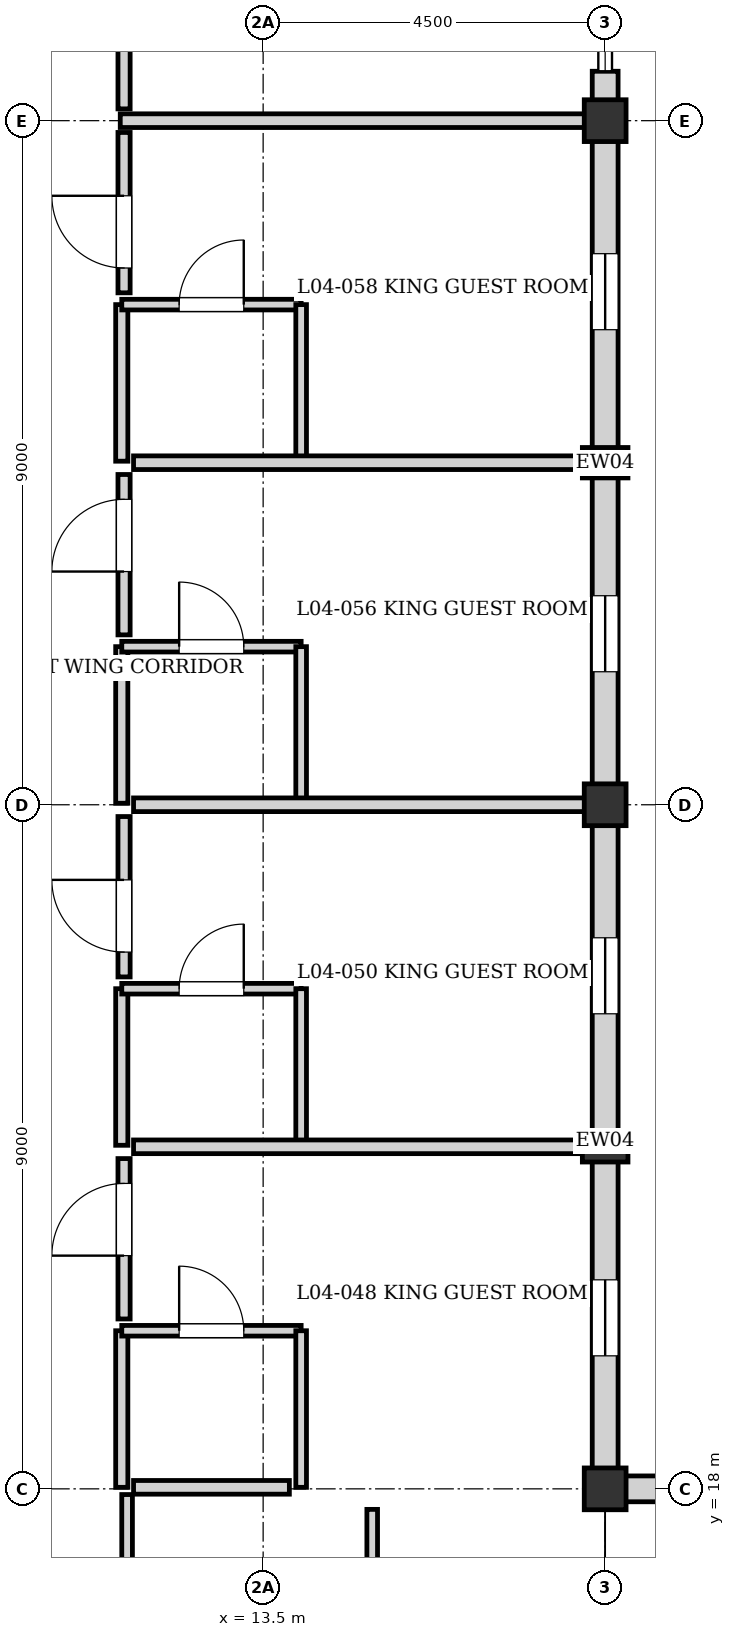
"""IFC4 building model, lengths in metres.
Left out: names, types, materials, properties, quantities, classifications, styles, units other than length and angle.
Written with IfcOpenShell. Run it as: python <this file> out.ifc"""

import sys

from ifc_helpers import new_model, si_unit, direction, frame, frame_2d, origin, origin_2d, place, context, subcontext, project, spatial, rectangle, extrude, element, fill, save


model = new_model("IFC4")
c1 = context("Model", 3, precision=1e-05, world=origin(), true_north=direction((0.0, 1.0)))
c2 = subcontext(c1, "Body", "Model", "MODEL_VIEW")
j1 = project(units=[si_unit("LENGTHUNIT", "METRE"), si_unit("PLANEANGLEUNIT", "RADIAN")], contexts=[c1])
p1 = place(None, origin())
s1 = spatial("IfcSite", under=j1, at=p1, CompositionType="ELEMENT")
p2 = place(p1, origin())
s2 = spatial("IfcBuilding", under=s1, at=p2, CompositionType="ELEMENT")
p3 = place(p2, frame((0.0, 0.0, 14.56)))
s3 = spatial("IfcBuildingStorey", under=s2, at=p3, CompositionType="ELEMENT", Elevation=14.56)
for number, where, z_axis, x_axis in (
    (1, (18.0, 18.0, 0.0), (0.0, 0.0, 1.0), (1.0, 0.0, 0.0)),
    (2, (18.0, 27.0, 0.0), (0.0, 0.0, 1.0), (1.0, 0.0, 0.0)),
    (3, (18.0, 36.0, 0.0), (0.0, 0.0, 1.0), (1.0, 0.0, 0.0)),
):
    element("IfcColumn", number, at=place(p3, frame(where, z_axis=z_axis, x_axis=x_axis)), inside=s3, PredefinedType="COLUMN", context=c2, shape_type="SweptSolid", body=[
        extrude(rectangle(XDim=0.55, YDim=0.55, at=origin_2d()), origin(), (0.0, 0.0, 1.0), 3.04),
    ])
for number, where, z_axis, x_axis in (
    (4, (18.0, 22.5, 0.0), (0.0, 0.0, 1.0), (0.0, 1.0, 0.0)),
    (5, (18.0, 31.5, 0.0), (0.0, 0.0, 1.0), (0.0, 1.0, 0.0)),
):
    element("IfcColumn", number, at=place(p3, frame(where, z_axis=z_axis, x_axis=x_axis)), inside=s3, PredefinedType="PILASTER", context=c2, shape_type="SweptSolid", body=[
        extrude(rectangle(XDim=0.4, YDim=0.6, at=origin_2d()), origin(), (0.0, 0.0, 1.0), 3.04),
    ])
p4 = place(p3, frame((18.0, 36.65, 0.0), z_axis=(0.0, 0.0, 1.0), x_axis=(0.0, -1.0, 0.0)))
e6 = element("IfcWall", 6, at=p4, inside=s3, PredefinedType="SOLIDWALL", context=c2, shape_type="SweptSolid", body=[
    extrude(rectangle(XDim=0.65, YDim=0.34, at=frame_2d((0.325, 0.0))), origin(), (0.0, 0.0, 1.0), 2.38),
])
p5 = place(p3, frame((18.0, 36.0, 0.0), z_axis=(0.0, 0.0, 1.0), x_axis=(0.0, -1.0, 0.0)))
e7 = element("IfcWall", 7, at=p5, inside=s3, PredefinedType="SOLIDWALL", context=c2, shape_type="SweptSolid", body=[
    extrude(rectangle(XDim=9.0, YDim=0.34, at=frame_2d((4.5, 0.0))), origin(), (0.0, 0.0, 1.0), 2.42),
])
p6 = place(p5, frame((1.75, 0.0, 0.35)))
e8 = element("IfcOpeningElement", 8, at=p6, cuts=e7, PredefinedType="OPENING", context=c2, shape_type="SweptSolid", body=[
    extrude(rectangle(XDim=1.0, YDim=1.6, at=frame_2d((0.5, 0.8))), frame((0.0, 0.18, 0.0), z_axis=(0.0, -1.0, 0.0), x_axis=(1.0, 0.0, 0.0)), (0.0, 0.0, 1.0), 0.36),
])
p7 = place(p5, frame((6.25, 0.0, 0.35)))
e9 = element("IfcOpeningElement", 9, at=p7, cuts=e7, PredefinedType="OPENING", context=c2, shape_type="SweptSolid", body=[
    extrude(rectangle(XDim=1.0, YDim=1.6, at=frame_2d((0.5, 0.8))), frame((0.0, 0.18, 0.0), z_axis=(0.0, -1.0, 0.0), x_axis=(1.0, 0.0, 0.0)), (0.0, 0.0, 1.0), 0.36),
])
p8 = place(p3, frame((18.0, 27.0, 0.0), z_axis=(0.0, 0.0, 1.0), x_axis=(0.0, -1.0, 0.0)))
e10 = element("IfcWall", 10, at=p8, inside=s3, PredefinedType="SOLIDWALL", context=c2, shape_type="SweptSolid", body=[
    extrude(rectangle(XDim=8.845, YDim=0.34, at=frame_2d((4.422, 0.0))), origin(), (0.0, 0.0, 1.0), 2.48),
])
p9 = place(p8, frame((1.75, 0.0, 0.35)))
e11 = element("IfcOpeningElement", 11, at=p9, cuts=e10, PredefinedType="OPENING", context=c2, shape_type="SweptSolid", body=[
    extrude(rectangle(XDim=1.0, YDim=1.6, at=frame_2d((0.5, 0.8))), frame((0.0, 0.18, 0.0), z_axis=(0.0, -1.0, 0.0), x_axis=(1.0, 0.0, 0.0)), (0.0, 0.0, 1.0), 0.36),
])
p10 = place(p8, frame((6.25, 0.0, 0.35)))
e12 = element("IfcOpeningElement", 12, at=p10, cuts=e10, PredefinedType="OPENING", context=c2, shape_type="SweptSolid", body=[
    extrude(rectangle(XDim=1.0, YDim=1.6, at=frame_2d((0.5, 0.8))), frame((0.0, 0.18, 0.0), z_axis=(0.0, -1.0, 0.0), x_axis=(1.0, 0.0, 0.0)), (0.0, 0.0, 1.0), 0.36),
])
p11 = place(p3, frame((18.0, 18.0, 0.0), z_axis=(0.0, 0.0, 1.0), x_axis=(1.0, 0.0, 0.0)))
e13 = element("IfcWall", 13, at=p11, inside=s3, PredefinedType="SOLIDWALL", context=c2, shape_type="SweptSolid", body=[
    extrude(rectangle(XDim=9.0, YDim=0.34, at=frame_2d((4.5, 0.0))), origin(), (0.0, 0.0, 1.0), 2.55),
])
p12 = place(p11, frame((1.75, 0.0, 0.35)))
e14 = element("IfcOpeningElement", 14, at=p12, cuts=e13, PredefinedType="OPENING", context=c2, shape_type="SweptSolid", body=[
    extrude(rectangle(XDim=1.0, YDim=1.6, at=frame_2d((0.5, 0.8))), frame((0.0, 0.18, 0.0), z_axis=(0.0, -1.0, 0.0), x_axis=(1.0, 0.0, 0.0)), (0.0, 0.0, 1.0), 0.36),
])
p13 = place(p11, frame((6.25, 0.0, 0.35)))
e15 = element("IfcOpeningElement", 15, at=p13, cuts=e13, PredefinedType="OPENING", context=c2, shape_type="SweptSolid", body=[
    extrude(rectangle(XDim=1.0, YDim=1.6, at=frame_2d((0.5, 0.8))), frame((0.0, 0.18, 0.0), z_axis=(0.0, -1.0, 0.0), x_axis=(1.0, 0.0, 0.0)), (0.0, 0.0, 1.0), 0.36),
])
p14 = place(p3, frame((11.64, 18.02, 0.0), z_axis=(0.0, 0.0, 1.0), x_axis=(0.0, 1.0, 0.0)))
e16 = element("IfcWall", 16, at=p14, inside=s3, PredefinedType="PARTITIONING", context=c2, shape_type="SweptSolid", body=[
    extrude(rectangle(XDim=2.06, YDim=0.16, at=frame_2d((1.03, 0.0))), origin(), (0.0, 0.0, 1.0), 2.82),
])
p15 = place(p3, frame((11.64, 20.08, 0.0), z_axis=(0.0, 0.0, 1.0), x_axis=(1.0, 0.0, 0.0)))
e17 = element("IfcWall", 17, at=p15, inside=s3, PredefinedType="PLUMBINGWALL", context=c2, shape_type="SweptSolid", body=[
    extrude(rectangle(XDim=2.36, YDim=0.14, at=frame_2d((1.18, 0.0))), origin(), (0.0, 0.0, 1.0), 2.82),
])
p16 = place(p15, frame((0.755, 0.0, 0.0)))
e18 = element("IfcOpeningElement", 18, at=p16, cuts=e17, PredefinedType="OPENING", context=c2, shape_type="SweptSolid", body=[
    extrude(rectangle(XDim=0.85, YDim=2.04, at=frame_2d((0.425, 1.02))), frame((0.0, 0.08, 0.0), z_axis=(0.0, -1.0, 0.0), x_axis=(1.0, 0.0, 0.0)), (0.0, 0.0, 1.0), 0.16),
])
p17 = place(p3, frame((14.0, 18.02, 0.0), z_axis=(0.0, 0.0, 1.0), x_axis=(0.0, 1.0, 0.0)))
e19 = element("IfcWall", 19, at=p17, inside=s3, PredefinedType="PLUMBINGWALL", context=c2, shape_type="SweptSolid", body=[
    extrude(rectangle(XDim=2.06, YDim=0.14, at=frame_2d((1.03, 0.0))), origin(), (0.0, 0.0, 1.0), 2.82),
])
p18 = place(p3, frame((11.64, 22.52, 0.0), z_axis=(0.0, 0.0, 1.0), x_axis=(0.0, 1.0, 0.0)))
e20 = element("IfcWall", 20, at=p18, inside=s3, PredefinedType="PARTITIONING", context=c2, shape_type="SweptSolid", body=[
    extrude(rectangle(XDim=2.06, YDim=0.16, at=frame_2d((1.03, 0.0))), origin(), (0.0, 0.0, 1.0), 2.82),
])
p19 = place(p3, frame((11.64, 24.58, 0.0), z_axis=(0.0, 0.0, 1.0), x_axis=(1.0, 0.0, 0.0)))
e21 = element("IfcWall", 21, at=p19, inside=s3, PredefinedType="PLUMBINGWALL", context=c2, shape_type="SweptSolid", body=[
    extrude(rectangle(XDim=2.36, YDim=0.14, at=frame_2d((1.18, 0.0))), origin(), (0.0, 0.0, 1.0), 2.82),
])
p20 = place(p19, frame((0.755, 0.0, 0.0)))
e22 = element("IfcOpeningElement", 22, at=p20, cuts=e21, PredefinedType="OPENING", context=c2, shape_type="SweptSolid", body=[
    extrude(rectangle(XDim=0.85, YDim=2.04, at=frame_2d((0.425, 1.02))), frame((0.0, 0.08, 0.0), z_axis=(0.0, -1.0, 0.0), x_axis=(1.0, 0.0, 0.0)), (0.0, 0.0, 1.0), 0.16),
])
p21 = place(p3, frame((14.0, 22.52, 0.0), z_axis=(0.0, 0.0, 1.0), x_axis=(0.0, 1.0, 0.0)))
e23 = element("IfcWall", 23, at=p21, inside=s3, PredefinedType="PLUMBINGWALL", context=c2, shape_type="SweptSolid", body=[
    extrude(rectangle(XDim=2.06, YDim=0.14, at=frame_2d((1.03, 0.0))), origin(), (0.0, 0.0, 1.0), 2.82),
])
p22 = place(p3, frame((11.64, 27.02, 0.0), z_axis=(0.0, 0.0, 1.0), x_axis=(0.0, 1.0, 0.0)))
e24 = element("IfcWall", 24, at=p22, inside=s3, PredefinedType="PARTITIONING", context=c2, shape_type="SweptSolid", body=[
    extrude(rectangle(XDim=2.06, YDim=0.16, at=frame_2d((1.03, 0.0))), origin(), (0.0, 0.0, 1.0), 2.82),
])
p23 = place(p3, frame((11.64, 29.08, 0.0), z_axis=(0.0, 0.0, 1.0), x_axis=(1.0, 0.0, 0.0)))
e25 = element("IfcWall", 25, at=p23, inside=s3, PredefinedType="PLUMBINGWALL", context=c2, shape_type="SweptSolid", body=[
    extrude(rectangle(XDim=2.36, YDim=0.14, at=frame_2d((1.18, 0.0))), origin(), (0.0, 0.0, 1.0), 2.82),
])
p24 = place(p23, frame((0.755, 0.0, 0.0)))
e26 = element("IfcOpeningElement", 26, at=p24, cuts=e25, PredefinedType="OPENING", context=c2, shape_type="SweptSolid", body=[
    extrude(rectangle(XDim=0.85, YDim=2.04, at=frame_2d((0.425, 1.02))), frame((0.0, 0.08, 0.0), z_axis=(0.0, -1.0, 0.0), x_axis=(1.0, 0.0, 0.0)), (0.0, 0.0, 1.0), 0.16),
])
p25 = place(p3, frame((14.0, 27.02, 0.0), z_axis=(0.0, 0.0, 1.0), x_axis=(0.0, 1.0, 0.0)))
e27 = element("IfcWall", 27, at=p25, inside=s3, PredefinedType="PLUMBINGWALL", context=c2, shape_type="SweptSolid", body=[
    extrude(rectangle(XDim=2.06, YDim=0.14, at=frame_2d((1.03, 0.0))), origin(), (0.0, 0.0, 1.0), 2.82),
])
p26 = place(p3, frame((11.64, 31.52, 0.0), z_axis=(0.0, 0.0, 1.0), x_axis=(0.0, 1.0, 0.0)))
e28 = element("IfcWall", 28, at=p26, inside=s3, PredefinedType="PARTITIONING", context=c2, shape_type="SweptSolid", body=[
    extrude(rectangle(XDim=2.06, YDim=0.16, at=frame_2d((1.03, 0.0))), origin(), (0.0, 0.0, 1.0), 2.82),
])
p27 = place(p3, frame((11.64, 33.58, 0.0), z_axis=(0.0, 0.0, 1.0), x_axis=(1.0, 0.0, 0.0)))
e29 = element("IfcWall", 29, at=p27, inside=s3, PredefinedType="PLUMBINGWALL", context=c2, shape_type="SweptSolid", body=[
    extrude(rectangle(XDim=2.36, YDim=0.14, at=frame_2d((1.18, 0.0))), origin(), (0.0, 0.0, 1.0), 2.82),
])
p28 = place(p27, frame((0.755, 0.0, 0.0)))
e30 = element("IfcOpeningElement", 30, at=p28, cuts=e29, PredefinedType="OPENING", context=c2, shape_type="SweptSolid", body=[
    extrude(rectangle(XDim=0.85, YDim=2.04, at=frame_2d((0.425, 1.02))), frame((0.0, 0.08, 0.0), z_axis=(0.0, -1.0, 0.0), x_axis=(1.0, 0.0, 0.0)), (0.0, 0.0, 1.0), 0.16),
])
p29 = place(p3, frame((14.0, 31.52, 0.0), z_axis=(0.0, 0.0, 1.0), x_axis=(0.0, 1.0, 0.0)))
e31 = element("IfcWall", 31, at=p29, inside=s3, PredefinedType="PLUMBINGWALL", context=c2, shape_type="SweptSolid", body=[
    extrude(rectangle(XDim=2.06, YDim=0.14, at=frame_2d((1.03, 0.0))), origin(), (0.0, 0.0, 1.0), 2.82),
])
p30 = place(p3, frame((11.795, 22.5, 0.0), z_axis=(0.0, 0.0, 1.0), x_axis=(1.0, 0.0, 0.0)))
e32 = element("IfcWall", 32, at=p30, inside=s3, PredefinedType="PARTITIONING", context=c2, shape_type="SweptSolid", body=[
    extrude(rectangle(XDim=6.03, YDim=0.18, at=frame_2d((3.015, 0.0))), origin(), (0.0, 0.0, 1.0), 2.82),
])
p31 = place(p3, frame((11.795, 27.0, 0.0), z_axis=(0.0, 0.0, 1.0), x_axis=(1.0, 0.0, 0.0)))
e33 = element("IfcWall", 33, at=p31, inside=s3, PredefinedType="PARTITIONING", context=c2, shape_type="SweptSolid", body=[
    extrude(rectangle(XDim=6.03, YDim=0.18, at=frame_2d((3.015, 0.0))), origin(), (0.0, 0.0, 1.0), 2.34),
])
p32 = place(p3, frame((11.795, 31.5, 0.0), z_axis=(0.0, 0.0, 1.0), x_axis=(1.0, 0.0, 0.0)))
e34 = element("IfcWall", 34, at=p32, inside=s3, PredefinedType="PARTITIONING", context=c2, shape_type="SweptSolid", body=[
    extrude(rectangle(XDim=6.03, YDim=0.18, at=frame_2d((3.015, 0.0))), origin(), (0.0, 0.0, 1.0), 2.82),
])
p33 = place(p3, frame((11.62, 36.0, 0.0), z_axis=(0.0, 0.0, 1.0), x_axis=(1.0, 0.0, 0.0)))
e35 = element("IfcWall", 35, at=p33, inside=s3, PredefinedType="PARTITIONING", context=c2, shape_type="SweptSolid", body=[
    extrude(rectangle(XDim=6.205, YDim=0.18, at=frame_2d((3.103, 0.0))), origin(), (0.0, 0.0, 1.0), 2.29),
])
p34 = place(p3, frame((11.795, 18.02, 0.0), z_axis=(0.0, 0.0, 1.0), x_axis=(1.0, 0.0, 0.0)))
e36 = element("IfcWall", 36, at=p34, inside=s3, PredefinedType="PARTITIONING", context=c2, shape_type="SweptSolid", body=[
    extrude(rectangle(XDim=2.05, YDim=0.18, at=frame_2d((1.025, 0.0))), origin(), (0.0, 0.0, 1.0), 2.38),
])
p35 = place(p3, frame((11.71, 11.705, 0.0), z_axis=(0.0, 0.0, 1.0), x_axis=(0.0, 1.0, 0.0)))
e37 = element("IfcWall", 37, at=p35, inside=s3, PredefinedType="PLUMBINGWALL", context=c2, shape_type="SweptSolid", body=[
    extrude(rectangle(XDim=6.22, YDim=0.14, at=frame_2d((3.11, 0.0))), origin(), (0.0, 0.0, 1.0), 2.82),
])
p36 = place(p35, frame((1.914, 0.0, 0.0)))
e38 = element("IfcOpeningElement", 38, at=p36, cuts=e37, PredefinedType="OPENING", context=c2, shape_type="SweptSolid", body=[
    extrude(rectangle(XDim=0.9, YDim=2.1, at=frame_2d((0.45, 1.05))), frame((0.0, 0.08, 0.0), z_axis=(0.0, -1.0, 0.0), x_axis=(1.0, 0.0, 0.0)), (0.0, 0.0, 1.0), 0.16),
])
p37 = place(p3, frame((11.67, 20.235, 0.0), z_axis=(0.0, 0.0, 1.0), x_axis=(0.0, 1.0, 0.0)))
e39 = element("IfcWall", 39, at=p37, inside=s3, PredefinedType="PARTITIONING", context=c2, shape_type="SweptSolid", body=[
    extrude(rectangle(XDim=2.11, YDim=0.16, at=frame_2d((1.055, 0.0))), origin(), (0.0, 0.0, 1.0), 2.82),
])
p38 = place(p37, frame((0.833, 0.0, 0.0)))
e40 = element("IfcOpeningElement", 40, at=p38, cuts=e39, PredefinedType="OPENING", context=c2, shape_type="SweptSolid", body=[
    extrude(rectangle(XDim=0.95, YDim=2.15, at=frame_2d((0.475, 1.075))), frame((0.0, 0.09, 0.0), z_axis=(0.0, -1.0, 0.0), x_axis=(1.0, 0.0, 0.0)), (0.0, 0.0, 1.0), 0.18),
])
p39 = place(p3, frame((11.67, 24.735, 0.0), z_axis=(0.0, 0.0, 1.0), x_axis=(0.0, 1.0, 0.0)))
e41 = element("IfcWall", 41, at=p39, inside=s3, PredefinedType="PARTITIONING", context=c2, shape_type="SweptSolid", body=[
    extrude(rectangle(XDim=2.11, YDim=0.16, at=frame_2d((1.055, 0.0))), origin(), (0.0, 0.0, 1.0), 2.82),
])
p40 = place(p39, frame((0.327, 0.0, 0.0)))
e42 = element("IfcOpeningElement", 42, at=p40, cuts=e41, PredefinedType="OPENING", context=c2, shape_type="SweptSolid", body=[
    extrude(rectangle(XDim=0.95, YDim=2.15, at=frame_2d((0.475, 1.075))), frame((0.0, 0.09, 0.0), z_axis=(0.0, -1.0, 0.0), x_axis=(1.0, 0.0, 0.0)), (0.0, 0.0, 1.0), 0.18),
])
p41 = place(p3, frame((11.67, 29.235, 0.0), z_axis=(0.0, 0.0, 1.0), x_axis=(0.0, 1.0, 0.0)))
e43 = element("IfcWall", 43, at=p41, inside=s3, PredefinedType="PARTITIONING", context=c2, shape_type="SweptSolid", body=[
    extrude(rectangle(XDim=2.11, YDim=0.16, at=frame_2d((1.055, 0.0))), origin(), (0.0, 0.0, 1.0), 2.82),
])
p42 = place(p41, frame((0.833, 0.0, 0.0)))
e44 = element("IfcOpeningElement", 44, at=p42, cuts=e43, PredefinedType="OPENING", context=c2, shape_type="SweptSolid", body=[
    extrude(rectangle(XDim=0.95, YDim=2.15, at=frame_2d((0.475, 1.075))), frame((0.0, 0.09, 0.0), z_axis=(0.0, -1.0, 0.0), x_axis=(1.0, 0.0, 0.0)), (0.0, 0.0, 1.0), 0.18),
])
p43 = place(p3, frame((11.67, 33.735, 0.0), z_axis=(0.0, 0.0, 1.0), x_axis=(0.0, 1.0, 0.0)))
e45 = element("IfcWall", 45, at=p43, inside=s3, PredefinedType="PARTITIONING", context=c2, shape_type="SweptSolid", body=[
    extrude(rectangle(XDim=2.11, YDim=0.16, at=frame_2d((1.055, 0.0))), origin(), (0.0, 0.0, 1.0), 2.82),
])
p44 = place(p43, frame((0.327, 0.0, 0.0)))
e46 = element("IfcOpeningElement", 46, at=p44, cuts=e45, PredefinedType="OPENING", context=c2, shape_type="SweptSolid", body=[
    extrude(rectangle(XDim=0.95, YDim=2.15, at=frame_2d((0.475, 1.075))), frame((0.0, 0.09, 0.0), z_axis=(0.0, -1.0, 0.0), x_axis=(1.0, 0.0, 0.0)), (0.0, 0.0, 1.0), 0.18),
])
p45 = place(p3, frame((11.67, 36.155, 0.0), z_axis=(0.0, 0.0, 1.0), x_axis=(0.0, 1.0, 0.0)))
e47 = element("IfcWall", 47, at=p45, inside=s3, PredefinedType="PARTITIONING", context=c2, shape_type="SweptSolid", body=[
    extrude(rectangle(XDim=4.125, YDim=0.16, at=frame_2d((2.062, 0.0))), origin(), (0.0, 0.0, 1.0), 2.82),
])
p46 = place(p45, frame((2.058, 0.0, 0.0)))
e48 = element("IfcOpeningElement", 48, at=p46, cuts=e47, PredefinedType="OPENING", context=c2, shape_type="SweptSolid", body=[
    extrude(rectangle(XDim=1.0, YDim=2.1, at=frame_2d((0.5, 1.05))), frame((0.0, 0.09, 0.0), z_axis=(0.0, -1.0, 0.0), x_axis=(1.0, 0.0, 0.0)), (0.0, 0.0, 1.0), 0.18),
])
p47 = place(p3, frame((14.935, 14.845, 0.0), z_axis=(0.0, 0.0, 1.0), x_axis=(0.0, 1.0, 0.0)))
e49 = element("IfcWall", 49, at=p47, inside=s3, PredefinedType="PLUMBINGWALL", context=c2, shape_type="SweptSolid", body=[
    extrude(rectangle(XDim=2.885, YDim=0.14, at=frame_2d((1.442, 0.0))), origin(), (0.0, 0.0, 1.0), 2.82),
])
p48 = place(p47, frame((0.646, 0.0, 0.0)))
e50 = element("IfcOpeningElement", 50, at=p48, cuts=e49, PredefinedType="OPENING", context=c2, shape_type="SweptSolid", body=[
    extrude(rectangle(XDim=0.9, YDim=2.1, at=frame_2d((0.45, 1.05))), frame((0.0, 0.08, 0.0), z_axis=(0.0, -1.0, 0.0), x_axis=(1.0, 0.0, 0.0)), (0.0, 0.0, 1.0), 0.16),
])
p49 = place(p6, origin())
e51 = element("IfcWindow", 51, at=p49, inside=s3, PartitioningType="SINGLE_PANEL", PredefinedType="WINDOW", context=c2, shape_type="SweptSolid", body=[
    extrude(rectangle(XDim=1.0, YDim=1.6, at=frame_2d((0.5, 0.8))), frame((0.0, 0.03, 0.0), z_axis=(0.0, -1.0, 0.0), x_axis=(1.0, 0.0, 0.0)), (0.0, 0.0, 1.0), 0.06),
])
fill(e8, e51)
p50 = place(p7, origin())
e52 = element("IfcWindow", 52, at=p50, inside=s3, PartitioningType="SINGLE_PANEL", PredefinedType="WINDOW", context=c2, shape_type="SweptSolid", body=[
    extrude(rectangle(XDim=1.0, YDim=1.6, at=frame_2d((0.5, 0.8))), frame((0.0, 0.03, 0.0), z_axis=(0.0, -1.0, 0.0), x_axis=(1.0, 0.0, 0.0)), (0.0, 0.0, 1.0), 0.06),
])
fill(e9, e52)
p51 = place(p9, origin())
e53 = element("IfcWindow", 53, at=p51, inside=s3, PartitioningType="SINGLE_PANEL", PredefinedType="WINDOW", context=c2, shape_type="SweptSolid", body=[
    extrude(rectangle(XDim=1.0, YDim=1.6, at=frame_2d((0.5, 0.8))), frame((0.0, 0.03, 0.0), z_axis=(0.0, -1.0, 0.0), x_axis=(1.0, 0.0, 0.0)), (0.0, 0.0, 1.0), 0.06),
])
fill(e11, e53)
p52 = place(p10, origin())
e54 = element("IfcWindow", 54, at=p52, inside=s3, PartitioningType="SINGLE_PANEL", PredefinedType="WINDOW", context=c2, shape_type="SweptSolid", body=[
    extrude(rectangle(XDim=1.0, YDim=1.6, at=frame_2d((0.5, 0.8))), frame((0.0, 0.03, 0.0), z_axis=(0.0, -1.0, 0.0), x_axis=(1.0, 0.0, 0.0)), (0.0, 0.0, 1.0), 0.06),
])
fill(e12, e54)
p53 = place(p16, origin())
e55 = element("IfcDoor", 55, at=p53, inside=s3, OperationType="SINGLE_SWING_LEFT", PredefinedType="DOOR", context=c2, shape_type="SweptSolid", body=[
    extrude(rectangle(XDim=0.85, YDim=2.04, at=frame_2d((0.425, 1.02))), frame((0.0, 0.025, 0.0), z_axis=(0.0, -1.0, 0.0), x_axis=(1.0, 0.0, 0.0)), (0.0, 0.0, 1.0), 0.05),
])
fill(e18, e55)
p54 = place(p20, origin())
e56 = element("IfcDoor", 56, at=p54, inside=s3, OperationType="SINGLE_SWING_RIGHT", PredefinedType="DOOR", context=c2, shape_type="SweptSolid", body=[
    extrude(rectangle(XDim=0.85, YDim=2.04, at=frame_2d((0.425, 1.02))), frame((0.0, 0.025, 0.0), z_axis=(0.0, -1.0, 0.0), x_axis=(1.0, 0.0, 0.0)), (0.0, 0.0, 1.0), 0.05),
])
fill(e22, e56)
p55 = place(p24, origin())
e57 = element("IfcDoor", 57, at=p55, inside=s3, OperationType="SINGLE_SWING_LEFT", PredefinedType="DOOR", context=c2, shape_type="SweptSolid", body=[
    extrude(rectangle(XDim=0.85, YDim=2.04, at=frame_2d((0.425, 1.02))), frame((0.0, 0.025, 0.0), z_axis=(0.0, -1.0, 0.0), x_axis=(1.0, 0.0, 0.0)), (0.0, 0.0, 1.0), 0.05),
])
fill(e26, e57)
p56 = place(p28, origin())
e58 = element("IfcDoor", 58, at=p56, inside=s3, OperationType="SINGLE_SWING_RIGHT", PredefinedType="DOOR", context=c2, shape_type="SweptSolid", body=[
    extrude(rectangle(XDim=0.85, YDim=2.04, at=frame_2d((0.425, 1.02))), frame((0.0, 0.025, 0.0), z_axis=(0.0, -1.0, 0.0), x_axis=(1.0, 0.0, 0.0)), (0.0, 0.0, 1.0), 0.05),
])
fill(e30, e58)
p57 = place(p38, origin())
e59 = element("IfcDoor", 59, at=p57, inside=s3, OperationType="SINGLE_SWING_LEFT", PredefinedType="DOOR", context=c2, shape_type="SweptSolid", body=[
    extrude(rectangle(XDim=0.95, YDim=2.15, at=frame_2d((0.475, 1.075))), frame((0.0, 0.025, 0.0), z_axis=(0.0, -1.0, 0.0), x_axis=(1.0, 0.0, 0.0)), (0.0, 0.0, 1.0), 0.05),
])
fill(e40, e59)
p58 = place(p40, origin())
e60 = element("IfcDoor", 60, at=p58, inside=s3, OperationType="SINGLE_SWING_RIGHT", PredefinedType="DOOR", context=c2, shape_type="SweptSolid", body=[
    extrude(rectangle(XDim=0.95, YDim=2.15, at=frame_2d((0.475, 1.075))), frame((0.0, 0.025, 0.0), z_axis=(0.0, -1.0, 0.0), x_axis=(1.0, 0.0, 0.0)), (0.0, 0.0, 1.0), 0.05),
])
fill(e42, e60)
p59 = place(p42, origin())
e61 = element("IfcDoor", 61, at=p59, inside=s3, OperationType="SINGLE_SWING_LEFT", PredefinedType="DOOR", context=c2, shape_type="SweptSolid", body=[
    extrude(rectangle(XDim=0.95, YDim=2.15, at=frame_2d((0.475, 1.075))), frame((0.0, 0.025, 0.0), z_axis=(0.0, -1.0, 0.0), x_axis=(1.0, 0.0, 0.0)), (0.0, 0.0, 1.0), 0.05),
])
fill(e44, e61)
p60 = place(p44, origin())
e62 = element("IfcDoor", 62, at=p60, inside=s3, OperationType="SINGLE_SWING_RIGHT", PredefinedType="DOOR", context=c2, shape_type="SweptSolid", body=[
    extrude(rectangle(XDim=0.95, YDim=2.15, at=frame_2d((0.475, 1.075))), frame((0.0, 0.025, 0.0), z_axis=(0.0, -1.0, 0.0), x_axis=(1.0, 0.0, 0.0)), (0.0, 0.0, 1.0), 0.05),
])
fill(e46, e62)
save(model, sys.argv[1])
